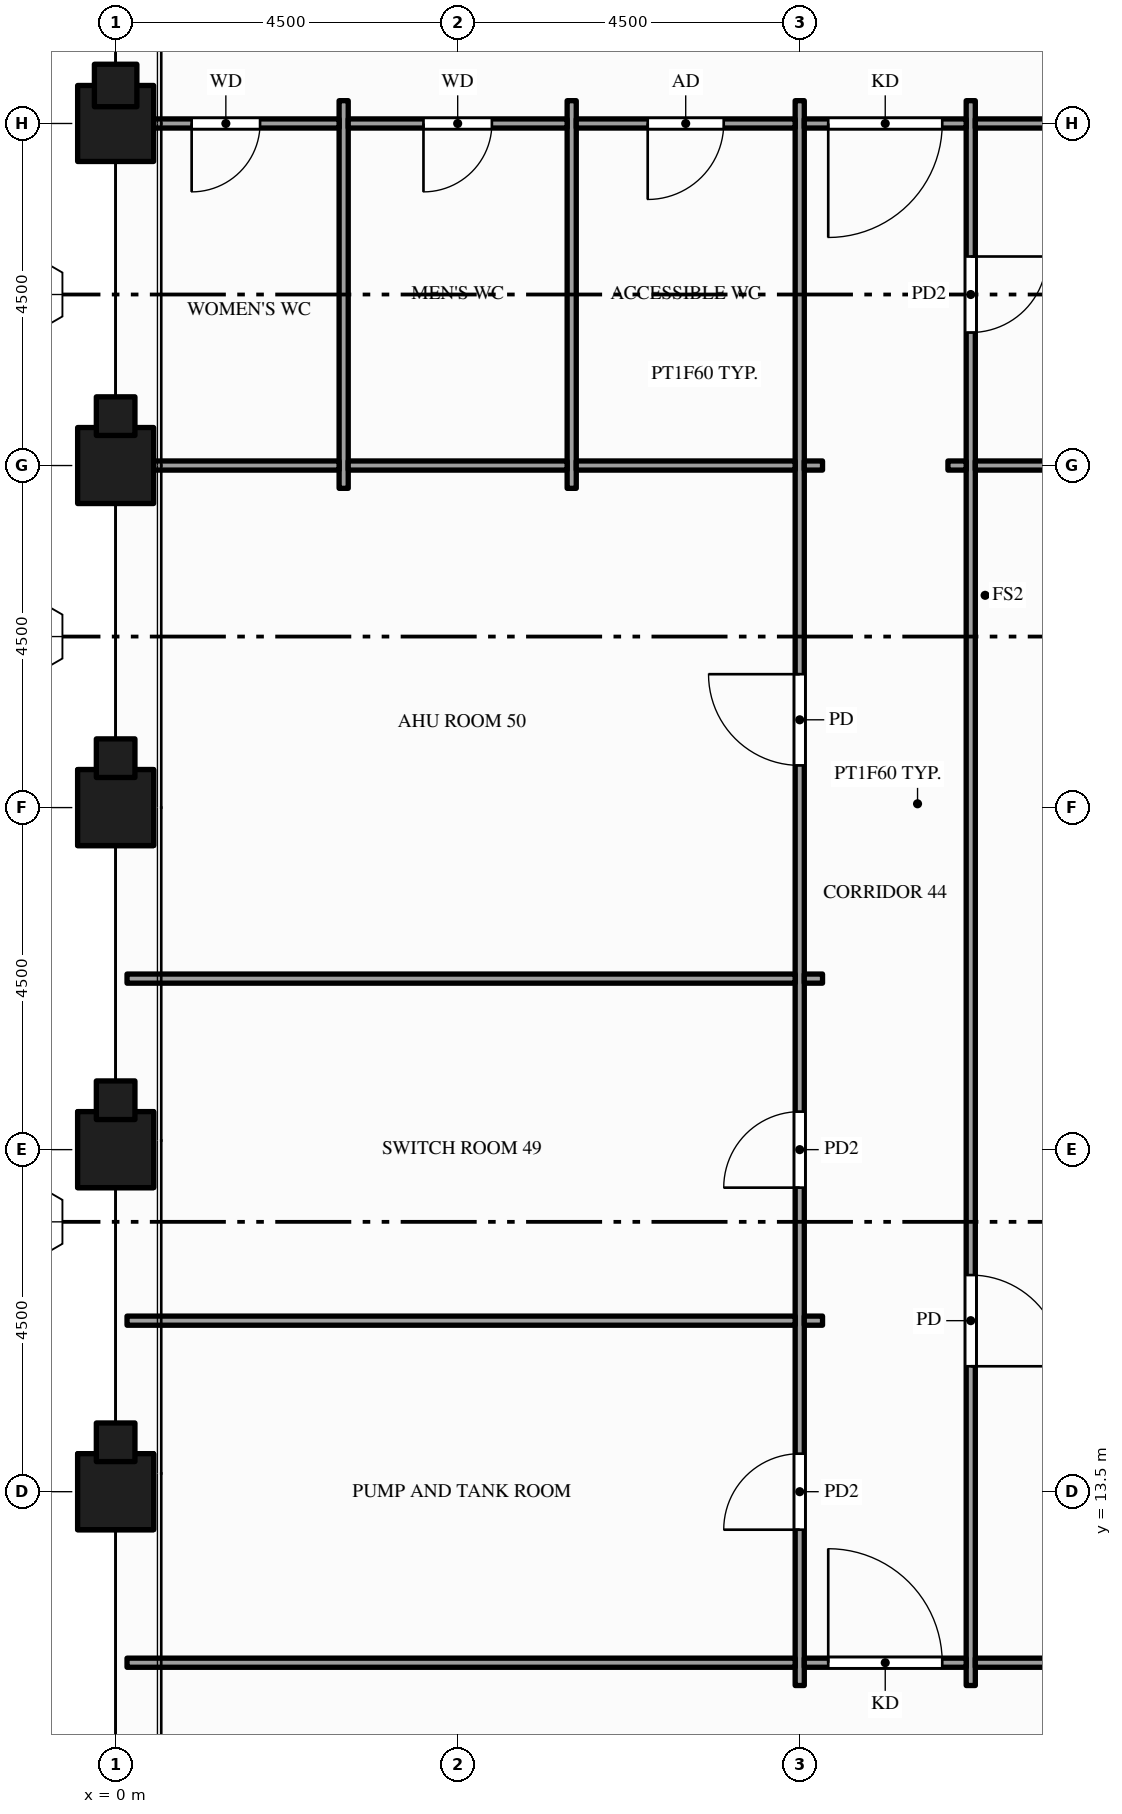
"""IFC4 building model, lengths in metres.
Left out: names, types, materials, properties, quantities, classifications, styles, units other than length and angle.
Written with IfcOpenShell. Run it as: python <this file> out.ifc"""

import sys

from ifc_helpers import new_model, si_unit, direction, frame, frame_2d, origin, origin_2d, place, context, subcontext, project, spatial, rectangle, hollow_rectangle, extrude, element, fill, save


model = new_model("IFC4")
c1 = context("Model", 3, precision=1e-05, world=origin(), true_north=direction((0.0, 1.0)))
c2 = subcontext(c1, "Body", "Model", "MODEL_VIEW")
j1 = project(units=[si_unit("LENGTHUNIT", "METRE"), si_unit("PLANEANGLEUNIT", "RADIAN")], contexts=[c1])
p1 = place(None, origin())
s1 = spatial("IfcSite", under=j1, at=p1, CompositionType="ELEMENT")
p2 = place(p1, origin())
s2 = spatial("IfcBuilding", under=s1, at=p2, CompositionType="ELEMENT")
p3 = place(p2, frame((0.0, 0.0, 131.0)))
s3 = spatial("IfcBuildingStorey", under=s2, at=p3, CompositionType="ELEMENT", Elevation=131.0)
p4 = place(p3, frame((0.0, 13.5, -0.25), z_axis=(0.0, 0.0, 1.0), x_axis=(1.0, 0.0, 0.0)))
e1 = element("IfcColumn", 1, at=p4, inside=s3, PredefinedType="COLUMN", context=c2, shape_type="SweptSolid", body=[
    extrude(hollow_rectangle(XDim=1.0, YDim=1.0, WallThickness=0.05, at=origin_2d()), origin(), (0.0, 0.0, 1.0), 6.6),
])
p5 = place(p3, frame((0.0, 13.5, 6.35), z_axis=(0.0, 0.0, 1.0), x_axis=(1.0, 0.0, 0.0)))
e2 = element("IfcColumn", 2, at=p5, inside=s3, PredefinedType="COLUMN", context=c2, shape_type="SweptSolid", body=[
    extrude(rectangle(XDim=1.0, YDim=1.0, at=origin_2d()), origin(), (0.0, 0.0, 1.0), 1.5),
])
p6 = place(p3, frame((0.0, 18.0, -0.25), z_axis=(0.0, 0.0, 1.0), x_axis=(1.0, 0.0, 0.0)))
e3 = element("IfcColumn", 3, at=p6, inside=s3, PredefinedType="COLUMN", context=c2, shape_type="SweptSolid", body=[
    extrude(hollow_rectangle(XDim=1.0, YDim=1.0, WallThickness=0.05, at=origin_2d()), origin(), (0.0, 0.0, 1.0), 6.6),
])
p7 = place(p3, frame((0.0, 18.0, 6.35), z_axis=(0.0, 0.0, 1.0), x_axis=(1.0, 0.0, 0.0)))
e4 = element("IfcColumn", 4, at=p7, inside=s3, PredefinedType="COLUMN", context=c2, shape_type="SweptSolid", body=[
    extrude(rectangle(XDim=1.0, YDim=1.0, at=origin_2d()), origin(), (0.0, 0.0, 1.0), 1.5),
])
p8 = place(p3, frame((0.0, 22.5, -0.25), z_axis=(0.0, 0.0, 1.0), x_axis=(1.0, 0.0, 0.0)))
e5 = element("IfcColumn", 5, at=p8, inside=s3, PredefinedType="COLUMN", context=c2, shape_type="SweptSolid", body=[
    extrude(hollow_rectangle(XDim=1.0, YDim=1.0, WallThickness=0.05, at=origin_2d()), origin(), (0.0, 0.0, 1.0), 6.6),
])
p9 = place(p3, frame((0.0, 22.5, 6.35), z_axis=(0.0, 0.0, 1.0), x_axis=(1.0, 0.0, 0.0)))
e6 = element("IfcColumn", 6, at=p9, inside=s3, PredefinedType="COLUMN", context=c2, shape_type="SweptSolid", body=[
    extrude(rectangle(XDim=1.0, YDim=1.0, at=origin_2d()), origin(), (0.0, 0.0, 1.0), 1.5),
])
for number, where, z_axis, x_axis in (
    (7, (0.0, 27.0, -0.25), (0.0, 0.0, 1.0), (1.0, 0.0, 0.0)),
    (8, (0.0, 31.5, -0.25), (0.0, 0.0, 1.0), (1.0, 0.0, 0.0)),
):
    element("IfcColumn", number, at=place(p3, frame(where, z_axis=z_axis, x_axis=x_axis)), inside=s3, PredefinedType="COLUMN", context=c2, shape_type="SweptSolid", body=[
        extrude(hollow_rectangle(XDim=1.0, YDim=1.0, WallThickness=0.05, at=origin_2d()), origin(), (0.0, 0.0, 1.0), 8.1),
    ])
for number, where, z_axis, x_axis in (
    (9, (3.0, 26.7, 0.0), (0.0, 0.0, 1.0), (0.0, 1.0, 0.0)),
    (10, (6.0, 26.7, 0.0), (0.0, 0.0, 1.0), (0.0, 1.0, 0.0)),
):
    element("IfcWall", number, at=place(p3, frame(where, z_axis=z_axis, x_axis=x_axis)), inside=s3, PredefinedType="PARTITIONING", context=c2, shape_type="SweptSolid", body=[
        extrude(rectangle(XDim=5.1, YDim=0.12, at=frame_2d((2.55, 0.0))), origin(), (0.0, 0.0, 1.0), 7.85),
    ])
p10 = place(p3, frame((9.0, 10.95, 0.0), z_axis=(0.0, 0.0, 1.0), x_axis=(0.0, 1.0, 0.0)))
e11 = element("IfcWall", 11, at=p10, inside=s3, PredefinedType="PARTITIONING", context=c2, shape_type="SweptSolid", body=[
    extrude(rectangle(XDim=20.85, YDim=0.12, at=frame_2d((10.425, 0.0))), origin(), (0.0, 0.0, 1.0), 6.6),
])
p11 = place(p10, frame((2.05, 0.0, 0.0)))
e12 = element("IfcOpeningElement", 12, at=p11, cuts=e11, PredefinedType="OPENING", context=c2, shape_type="SweptSolid", body=[
    extrude(rectangle(XDim=1.0, YDim=2.1, at=frame_2d((0.5, 1.05))), frame((0.0, 0.07, 0.0), z_axis=(0.0, -1.0, 0.0), x_axis=(1.0, 0.0, 0.0)), (0.0, 0.0, 1.0), 0.14),
])
p12 = place(p10, frame((6.55, 0.0, 0.0)))
e13 = element("IfcOpeningElement", 13, at=p12, cuts=e11, PredefinedType="OPENING", context=c2, shape_type="SweptSolid", body=[
    extrude(rectangle(XDim=1.0, YDim=2.1, at=frame_2d((0.5, 1.05))), frame((0.0, 0.07, 0.0), z_axis=(0.0, -1.0, 0.0), x_axis=(1.0, 0.0, 0.0)), (0.0, 0.0, 1.0), 0.14),
])
p13 = place(p10, frame((12.105, 0.0, 0.0)))
e14 = element("IfcOpeningElement", 14, at=p13, cuts=e11, PredefinedType="OPENING", context=c2, shape_type="SweptSolid", body=[
    extrude(rectangle(XDim=1.2, YDim=2.1, at=frame_2d((0.6, 1.05))), frame((0.0, 0.07, 0.0), z_axis=(0.0, -1.0, 0.0), x_axis=(1.0, 0.0, 0.0)), (0.0, 0.0, 1.0), 0.14),
])
p14 = place(p3, frame((11.25, 10.95, 0.0), z_axis=(0.0, 0.0, 1.0), x_axis=(0.0, 1.0, 0.0)))
e15 = element("IfcWall", 15, at=p14, inside=s3, PredefinedType="PARTITIONING", context=c2, shape_type="SweptSolid", body=[
    extrude(rectangle(XDim=20.85, YDim=0.12, at=frame_2d((10.425, 0.0))), origin(), (0.0, 0.0, 1.0), 6.6),
])
p15 = place(p14, frame((17.8, 0.0, 0.0)))
e16 = element("IfcOpeningElement", 16, at=p15, cuts=e15, PredefinedType="OPENING", context=c2, shape_type="SweptSolid", body=[
    extrude(rectangle(XDim=1.0, YDim=2.1, at=frame_2d((0.5, 1.05))), frame((0.0, 0.07, 0.0), z_axis=(0.0, -1.0, 0.0), x_axis=(1.0, 0.0, 0.0)), (0.0, 0.0, 1.0), 0.14),
])
p16 = place(p14, frame((4.2, 0.0, 0.0)))
e17 = element("IfcOpeningElement", 17, at=p16, cuts=e15, PredefinedType="OPENING", context=c2, shape_type="SweptSolid", body=[
    extrude(rectangle(XDim=1.2, YDim=2.1, at=frame_2d((0.6, 1.05))), frame((0.0, 0.07, 0.0), z_axis=(0.0, -1.0, 0.0), x_axis=(1.0, 0.0, 0.0)), (0.0, 0.0, 1.0), 0.14),
])
p17 = place(p3, frame((0.15, 11.25, 0.0), z_axis=(0.0, 0.0, 1.0), x_axis=(1.0, 0.0, 0.0)))
e18 = element("IfcWall", 18, at=p17, inside=s3, PredefinedType="PARTITIONING", context=c2, shape_type="SweptSolid", body=[
    extrude(rectangle(XDim=8.79, YDim=0.12, at=frame_2d((4.395, 0.0))), origin(), (0.0, 0.0, 1.0), 6.87),
])
p18 = place(p3, frame((9.06, 11.25, 0.0), z_axis=(0.0, 0.0, 1.0), x_axis=(1.0, 0.0, 0.0)))
e19 = element("IfcWall", 19, at=p18, inside=s3, PredefinedType="PARTITIONING", context=c2, shape_type="SweptSolid", body=[
    extrude(rectangle(XDim=2.13, YDim=0.12, at=frame_2d((1.065, 0.0))), origin(), (0.0, 0.0, 1.0), 6.87),
])
p19 = place(p18, frame((0.315, 0.0, 0.0)))
e20 = element("IfcOpeningElement", 20, at=p19, cuts=e19, PredefinedType="OPENING", context=c2, shape_type="SweptSolid", body=[
    extrude(rectangle(XDim=1.5, YDim=2.1, at=frame_2d((0.75, 1.05))), frame((0.0, 0.07, 0.0), z_axis=(0.0, -1.0, 0.0), x_axis=(1.0, 0.0, 0.0)), (0.0, 0.0, 1.0), 0.14),
])
p20 = place(p3, frame((11.31, 11.25, 0.0), z_axis=(0.0, 0.0, 1.0), x_axis=(1.0, 0.0, 0.0)))
e21 = element("IfcWall", 21, at=p20, inside=s3, PredefinedType="PARTITIONING", context=c2, shape_type="SweptSolid", body=[
    extrude(rectangle(XDim=20.13, YDim=0.12, at=frame_2d((10.065, 0.0))), origin(), (0.0, 0.0, 1.0), 6.87),
])
p21 = place(p20, frame((9.165, 0.0, 0.0)))
e22 = element("IfcOpeningElement", 22, at=p21, cuts=e21, PredefinedType="OPENING", context=c2, shape_type="SweptSolid", body=[
    extrude(rectangle(XDim=1.8, YDim=2.1, at=frame_2d((0.9, 1.05))), frame((0.0, 0.07, 0.0), z_axis=(0.0, -1.0, 0.0), x_axis=(1.0, 0.0, 0.0)), (0.0, 0.0, 1.0), 0.14),
])
p22 = place(p3, frame((0.15, 15.75, 0.0), z_axis=(0.0, 0.0, 1.0), x_axis=(1.0, 0.0, 0.0)))
e23 = element("IfcWall", 23, at=p22, inside=s3, PredefinedType="PARTITIONING", context=c2, shape_type="SweptSolid", body=[
    extrude(rectangle(XDim=8.79, YDim=0.12, at=frame_2d((4.395, 0.0))), origin(), (0.0, 0.0, 1.0), 6.87),
])
p23 = place(p3, frame((9.06, 15.75, 0.0), z_axis=(0.0, 0.0, 1.0), x_axis=(1.0, 0.0, 0.0)))
e24 = element("IfcWall", 24, at=p23, inside=s3, PredefinedType="PARTITIONING", context=c2, shape_type="SweptSolid", body=[
    extrude(rectangle(XDim=0.24, YDim=0.12, at=frame_2d((0.12, 0.0))), origin(), (0.0, 0.0, 1.0), 6.87),
])
p24 = place(p3, frame((0.15, 20.25, 0.0), z_axis=(0.0, 0.0, 1.0), x_axis=(1.0, 0.0, 0.0)))
e25 = element("IfcWall", 25, at=p24, inside=s3, PredefinedType="PARTITIONING", context=c2, shape_type="SweptSolid", body=[
    extrude(rectangle(XDim=8.79, YDim=0.12, at=frame_2d((4.395, 0.0))), origin(), (0.0, 0.0, 1.0), 6.87),
])
p25 = place(p3, frame((9.06, 20.25, 0.0), z_axis=(0.0, 0.0, 1.0), x_axis=(1.0, 0.0, 0.0)))
e26 = element("IfcWall", 26, at=p25, inside=s3, PredefinedType="PARTITIONING", context=c2, shape_type="SweptSolid", body=[
    extrude(rectangle(XDim=0.24, YDim=0.12, at=frame_2d((0.12, 0.0))), origin(), (0.0, 0.0, 1.0), 6.87),
])
p26 = place(p3, frame((0.15, 27.0, 0.0), z_axis=(0.0, 0.0, 1.0), x_axis=(1.0, 0.0, 0.0)))
e27 = element("IfcWall", 27, at=p26, inside=s3, PredefinedType="PARTITIONING", context=c2, shape_type="SweptSolid", body=[
    extrude(rectangle(XDim=2.79, YDim=0.12, at=frame_2d((1.395, 0.0))), origin(), (0.0, 0.0, 1.0), 6.87),
])
for number, where, z_axis, x_axis in (
    (28, (3.06, 27.0, 0.0), (0.0, 0.0, 1.0), (1.0, 0.0, 0.0)),
    (29, (6.06, 27.0, 0.0), (0.0, 0.0, 1.0), (1.0, 0.0, 0.0)),
):
    element("IfcWall", number, at=place(p3, frame(where, z_axis=z_axis, x_axis=x_axis)), inside=s3, PredefinedType="PARTITIONING", context=c2, shape_type="SweptSolid", body=[
        extrude(rectangle(XDim=2.88, YDim=0.12, at=frame_2d((1.44, 0.0))), origin(), (0.0, 0.0, 1.0), 6.87),
    ])
for number, where, z_axis, x_axis in (
    (30, (9.06, 27.0, 0.0), (0.0, 0.0, 1.0), (1.0, 0.0, 0.0)),
    (31, (10.95, 27.0, 0.0), (0.0, 0.0, 1.0), (1.0, 0.0, 0.0)),
):
    element("IfcWall", number, at=place(p3, frame(where, z_axis=z_axis, x_axis=x_axis)), inside=s3, PredefinedType="PARTITIONING", context=c2, shape_type="SweptSolid", body=[
        extrude(rectangle(XDim=0.24, YDim=0.12, at=frame_2d((0.12, 0.0))), origin(), (0.0, 0.0, 1.0), 6.87),
    ])
p27 = place(p3, frame((11.31, 27.0, 0.0), z_axis=(0.0, 0.0, 1.0), x_axis=(1.0, 0.0, 0.0)))
e32 = element("IfcWall", 32, at=p27, inside=s3, PredefinedType="PARTITIONING", context=c2, shape_type="SweptSolid", body=[
    extrude(rectangle(XDim=11.04, YDim=0.12, at=frame_2d((5.52, 0.0))), origin(), (0.0, 0.0, 1.0), 6.87),
])
p28 = place(p3, frame((0.15, 31.5, 0.0), z_axis=(0.0, 0.0, 1.0), x_axis=(1.0, 0.0, 0.0)))
e33 = element("IfcWall", 33, at=p28, inside=s3, PredefinedType="PARTITIONING", context=c2, shape_type="SweptSolid", body=[
    extrude(rectangle(XDim=2.79, YDim=0.12, at=frame_2d((1.395, 0.0))), origin(), (0.0, 0.0, 1.0), 6.87),
])
p29 = place(p28, frame((0.85, 0.0, 0.0)))
e34 = element("IfcOpeningElement", 34, at=p29, cuts=e33, PredefinedType="OPENING", context=c2, shape_type="SweptSolid", body=[
    extrude(rectangle(XDim=0.9, YDim=2.1, at=frame_2d((0.45, 1.05))), frame((0.0, 0.07, 0.0), z_axis=(0.0, -1.0, 0.0), x_axis=(1.0, 0.0, 0.0)), (0.0, 0.0, 1.0), 0.14),
])
p30 = place(p3, frame((3.06, 31.5, 0.0), z_axis=(0.0, 0.0, 1.0), x_axis=(1.0, 0.0, 0.0)))
e35 = element("IfcWall", 35, at=p30, inside=s3, PredefinedType="PARTITIONING", context=c2, shape_type="SweptSolid", body=[
    extrude(rectangle(XDim=2.88, YDim=0.12, at=frame_2d((1.44, 0.0))), origin(), (0.0, 0.0, 1.0), 6.87),
])
p31 = place(p30, frame((0.99, 0.0, 0.0)))
e36 = element("IfcOpeningElement", 36, at=p31, cuts=e35, PredefinedType="OPENING", context=c2, shape_type="SweptSolid", body=[
    extrude(rectangle(XDim=0.9, YDim=2.1, at=frame_2d((0.45, 1.05))), frame((0.0, 0.07, 0.0), z_axis=(0.0, -1.0, 0.0), x_axis=(1.0, 0.0, 0.0)), (0.0, 0.0, 1.0), 0.14),
])
p32 = place(p3, frame((6.06, 31.5, 0.0), z_axis=(0.0, 0.0, 1.0), x_axis=(1.0, 0.0, 0.0)))
e37 = element("IfcWall", 37, at=p32, inside=s3, PredefinedType="PARTITIONING", context=c2, shape_type="SweptSolid", body=[
    extrude(rectangle(XDim=2.88, YDim=0.12, at=frame_2d((1.44, 0.0))), origin(), (0.0, 0.0, 1.0), 6.87),
])
p33 = place(p32, frame((0.94, 0.0, 0.0)))
e38 = element("IfcOpeningElement", 38, at=p33, cuts=e37, PredefinedType="OPENING", context=c2, shape_type="SweptSolid", body=[
    extrude(rectangle(XDim=1.0, YDim=2.1, at=frame_2d((0.5, 1.05))), frame((0.0, 0.07, 0.0), z_axis=(0.0, -1.0, 0.0), x_axis=(1.0, 0.0, 0.0)), (0.0, 0.0, 1.0), 0.14),
])
p34 = place(p3, frame((9.06, 31.5, 0.0), z_axis=(0.0, 0.0, 1.0), x_axis=(1.0, 0.0, 0.0)))
e39 = element("IfcWall", 39, at=p34, inside=s3, PredefinedType="PARTITIONING", context=c2, shape_type="SweptSolid", body=[
    extrude(rectangle(XDim=2.13, YDim=0.12, at=frame_2d((1.065, 0.0))), origin(), (0.0, 0.0, 1.0), 6.87),
])
p35 = place(p34, frame((0.315, 0.0, 0.0)))
e40 = element("IfcOpeningElement", 40, at=p35, cuts=e39, PredefinedType="OPENING", context=c2, shape_type="SweptSolid", body=[
    extrude(rectangle(XDim=1.5, YDim=2.1, at=frame_2d((0.75, 1.05))), frame((0.0, 0.07, 0.0), z_axis=(0.0, -1.0, 0.0), x_axis=(1.0, 0.0, 0.0)), (0.0, 0.0, 1.0), 0.14),
])
p36 = place(p3, frame((11.31, 31.5, 0.0), z_axis=(0.0, 0.0, 1.0), x_axis=(1.0, 0.0, 0.0)))
e41 = element("IfcWall", 41, at=p36, inside=s3, PredefinedType="PARTITIONING", context=c2, shape_type="SweptSolid", body=[
    extrude(rectangle(XDim=11.04, YDim=0.12, at=frame_2d((5.52, 0.0))), origin(), (0.0, 0.0, 1.0), 6.45),
])
p37 = place(p19, origin())
e42 = element("IfcDoor", 42, at=p37, inside=s3, OperationType="SINGLE_SWING_LEFT", PredefinedType="DOOR", context=c2, shape_type="SweptSolid", body=[
    extrude(rectangle(XDim=1.5, YDim=2.1, at=frame_2d((0.75, 1.05))), frame((0.0, 0.025, 0.0), z_axis=(0.0, -1.0, 0.0), x_axis=(1.0, 0.0, 0.0)), (0.0, 0.0, 1.0), 0.05),
])
fill(e20, e42)
p38 = place(p35, origin())
e43 = element("IfcDoor", 43, at=p38, inside=s3, OperationType="SINGLE_SWING_LEFT", PredefinedType="DOOR", context=c2, shape_type="SweptSolid", body=[
    extrude(rectangle(XDim=1.5, YDim=2.1, at=frame_2d((0.75, 1.05))), frame((0.0, 0.025, 0.0), z_axis=(0.0, -1.0, 0.0), x_axis=(1.0, 0.0, 0.0)), (0.0, 0.0, 1.0), 0.05),
])
fill(e40, e43)
p39 = place(p11, origin())
e44 = element("IfcDoor", 44, at=p39, inside=s3, OperationType="SINGLE_SWING_LEFT", PredefinedType="DOOR", context=c2, shape_type="SweptSolid", body=[
    extrude(rectangle(XDim=1.0, YDim=2.1, at=frame_2d((0.5, 1.05))), frame((0.0, 0.025, 0.0), z_axis=(0.0, -1.0, 0.0), x_axis=(1.0, 0.0, 0.0)), (0.0, 0.0, 1.0), 0.05),
])
fill(e12, e44)
p40 = place(p12, origin())
e45 = element("IfcDoor", 45, at=p40, inside=s3, OperationType="SINGLE_SWING_LEFT", PredefinedType="DOOR", context=c2, shape_type="SweptSolid", body=[
    extrude(rectangle(XDim=1.0, YDim=2.1, at=frame_2d((0.5, 1.05))), frame((0.0, 0.025, 0.0), z_axis=(0.0, -1.0, 0.0), x_axis=(1.0, 0.0, 0.0)), (0.0, 0.0, 1.0), 0.05),
])
fill(e13, e45)
p41 = place(p13, origin())
e46 = element("IfcDoor", 46, at=p41, inside=s3, OperationType="SINGLE_SWING_RIGHT", PredefinedType="DOOR", context=c2, shape_type="SweptSolid", body=[
    extrude(rectangle(XDim=1.2, YDim=2.1, at=frame_2d((0.6, 1.05))), frame((0.0, 0.025, 0.0), z_axis=(0.0, -1.0, 0.0), x_axis=(1.0, 0.0, 0.0)), (0.0, 0.0, 1.0), 0.05),
])
fill(e14, e46)
p42 = place(p29, origin())
e47 = element("IfcDoor", 47, at=p42, inside=s3, OperationType="SINGLE_SWING_LEFT", PredefinedType="DOOR", context=c2, shape_type="SweptSolid", body=[
    extrude(rectangle(XDim=0.9, YDim=2.1, at=frame_2d((0.45, 1.05))), frame((0.0, 0.025, 0.0), z_axis=(0.0, -1.0, 0.0), x_axis=(1.0, 0.0, 0.0)), (0.0, 0.0, 1.0), 0.05),
])
fill(e34, e47)
p43 = place(p31, origin())
e48 = element("IfcDoor", 48, at=p43, inside=s3, OperationType="SINGLE_SWING_LEFT", PredefinedType="DOOR", context=c2, shape_type="SweptSolid", body=[
    extrude(rectangle(XDim=0.9, YDim=2.1, at=frame_2d((0.45, 1.05))), frame((0.0, 0.025, 0.0), z_axis=(0.0, -1.0, 0.0), x_axis=(1.0, 0.0, 0.0)), (0.0, 0.0, 1.0), 0.05),
])
fill(e36, e48)
p44 = place(p33, origin())
e49 = element("IfcDoor", 49, at=p44, inside=s3, OperationType="SINGLE_SWING_LEFT", PredefinedType="DOOR", context=c2, shape_type="SweptSolid", body=[
    extrude(rectangle(XDim=1.0, YDim=2.1, at=frame_2d((0.5, 1.05))), frame((0.0, 0.025, 0.0), z_axis=(0.0, -1.0, 0.0), x_axis=(1.0, 0.0, 0.0)), (0.0, 0.0, 1.0), 0.05),
])
fill(e38, e49)
p45 = place(p15, origin())
e50 = element("IfcDoor", 50, at=p45, inside=s3, OperationType="SINGLE_SWING_RIGHT", PredefinedType="DOOR", context=c2, shape_type="SweptSolid", body=[
    extrude(rectangle(XDim=1.0, YDim=2.1, at=frame_2d((0.5, 1.05))), frame((0.0, 0.025, 0.0), z_axis=(0.0, -1.0, 0.0), x_axis=(1.0, 0.0, 0.0)), (0.0, 0.0, 1.0), 0.05),
])
fill(e16, e50)
p46 = place(p16, origin())
e51 = element("IfcDoor", 51, at=p46, inside=s3, OperationType="SINGLE_SWING_LEFT", PredefinedType="DOOR", context=c2, shape_type="SweptSolid", body=[
    extrude(rectangle(XDim=1.2, YDim=2.1, at=frame_2d((0.6, 1.05))), frame((0.0, 0.025, 0.0), z_axis=(0.0, -1.0, 0.0), x_axis=(1.0, 0.0, 0.0)), (0.0, 0.0, 1.0), 0.05),
])
fill(e17, e51)
save(model, sys.argv[1])
